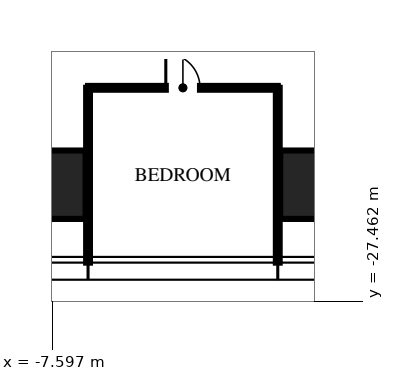
"""IFC4 building model, lengths in metres.
Left out: names, types, materials, properties, quantities, classifications, styles, units other than length and angle.
Written with IfcOpenShell. Run it as: python <this file> out.ifc"""

import sys

from ifc_helpers import new_model, si_unit, direction, frame, frame_2d, origin, origin_2d, place, context, subcontext, project, spatial, rectangle, hollow_rectangle, extrude, element, fill, save


model = new_model("IFC4")
c1 = context("Model", 3, precision=1e-05, world=origin(), true_north=direction((0.0, 1.0)))
c2 = subcontext(c1, "Body", "Model", "MODEL_VIEW")
j1 = project(units=[si_unit("LENGTHUNIT", "METRE"), si_unit("PLANEANGLEUNIT", "RADIAN")], contexts=[c1])
p1 = place(None, origin())
s1 = spatial("IfcSite", under=j1, at=p1, CompositionType="ELEMENT")
p2 = place(p1, origin())
s2 = spatial("IfcBuilding", under=s1, at=p2, CompositionType="ELEMENT")
p3 = place(p2, frame((0.0, 0.0, 207.0)))
s3 = spatial("IfcBuildingStorey", under=s2, at=p3, CompositionType="ELEMENT", Elevation=207.0)
for number, where, z_axis, x_axis in (
    (1, (0.0, -24.4, 0.0), (0.0, 0.0, 1.0), (1.0, 0.0, 0.0)),
    (2, (-8.32, -24.4, 0.0), (0.0, 0.0, 1.0), (1.0, 0.0, 0.0)),
):
    element("IfcColumn", number, at=place(p3, frame(where, z_axis=z_axis, x_axis=x_axis)), inside=s3, PredefinedType="COLUMN", context=c2, shape_type="SweptSolid", body=[
        extrude(hollow_rectangle(XDim=3.2, YDim=1.8, WallThickness=0.2, at=origin_2d()), origin(), (0.0, 0.0, 1.0), 3.75),
    ])
for number, where, z_axis, x_axis in (
    (3, (-6.656, -21.85, 0.0), (0.0, 0.0, 1.0), (0.0, -1.0, 0.0)),
    (4, (-1.664, -21.85, 0.0), (0.0, 0.0, 1.0), (0.0, -1.0, 0.0)),
):
    element("IfcWall", number, at=place(p3, frame(where, z_axis=z_axis, x_axis=x_axis)), inside=s3, PredefinedType="PARTITIONING", context=c2, shape_type="SweptSolid", body=[
        extrude(rectangle(XDim=4.6, YDim=0.1, at=frame_2d((2.3, 0.0))), origin(), (0.0, 0.0, 1.0), 2.91),
    ])
p4 = place(p3, frame((-6.656, -21.85, 0.0), z_axis=(0.0, 0.0, 1.0), x_axis=(1.0, 0.0, 0.0)))
e5 = element("IfcWall", 5, at=p4, inside=s3, PredefinedType="PARTITIONING", context=c2, shape_type="SweptSolid", body=[
    extrude(rectangle(XDim=4.992, YDim=0.1, at=frame_2d((2.496, 0.0))), origin(), (0.0, 0.0, 1.0), 2.81),
])
p5 = place(p4, frame((2.046, 0.0, 0.0)))
e6 = element("IfcOpeningElement", 6, at=p5, cuts=e5, PredefinedType="OPENING", context=c2, shape_type="SweptSolid", body=[
    extrude(rectangle(XDim=0.9, YDim=2.1, at=frame_2d((0.45, 1.05))), frame((0.0, 0.06, 0.0), z_axis=(0.0, -1.0, 0.0), x_axis=(1.0, 0.0, 0.0)), (0.0, 0.0, 1.0), 0.12),
])
p6 = place(p5, origin())
e7 = element("IfcDoor", 7, at=p6, inside=s3, OperationType="SINGLE_SWING_LEFT", PredefinedType="DOOR", context=c2, shape_type="SweptSolid", body=[
    extrude(rectangle(XDim=0.9, YDim=2.1, at=frame_2d((0.45, 1.05))), frame((0.0, 0.025, 0.0), z_axis=(0.0, -1.0, 0.0), x_axis=(1.0, 0.0, 0.0)), (0.0, 0.0, 1.0), 0.05),
])
fill(e6, e7)
save(model, sys.argv[1])
